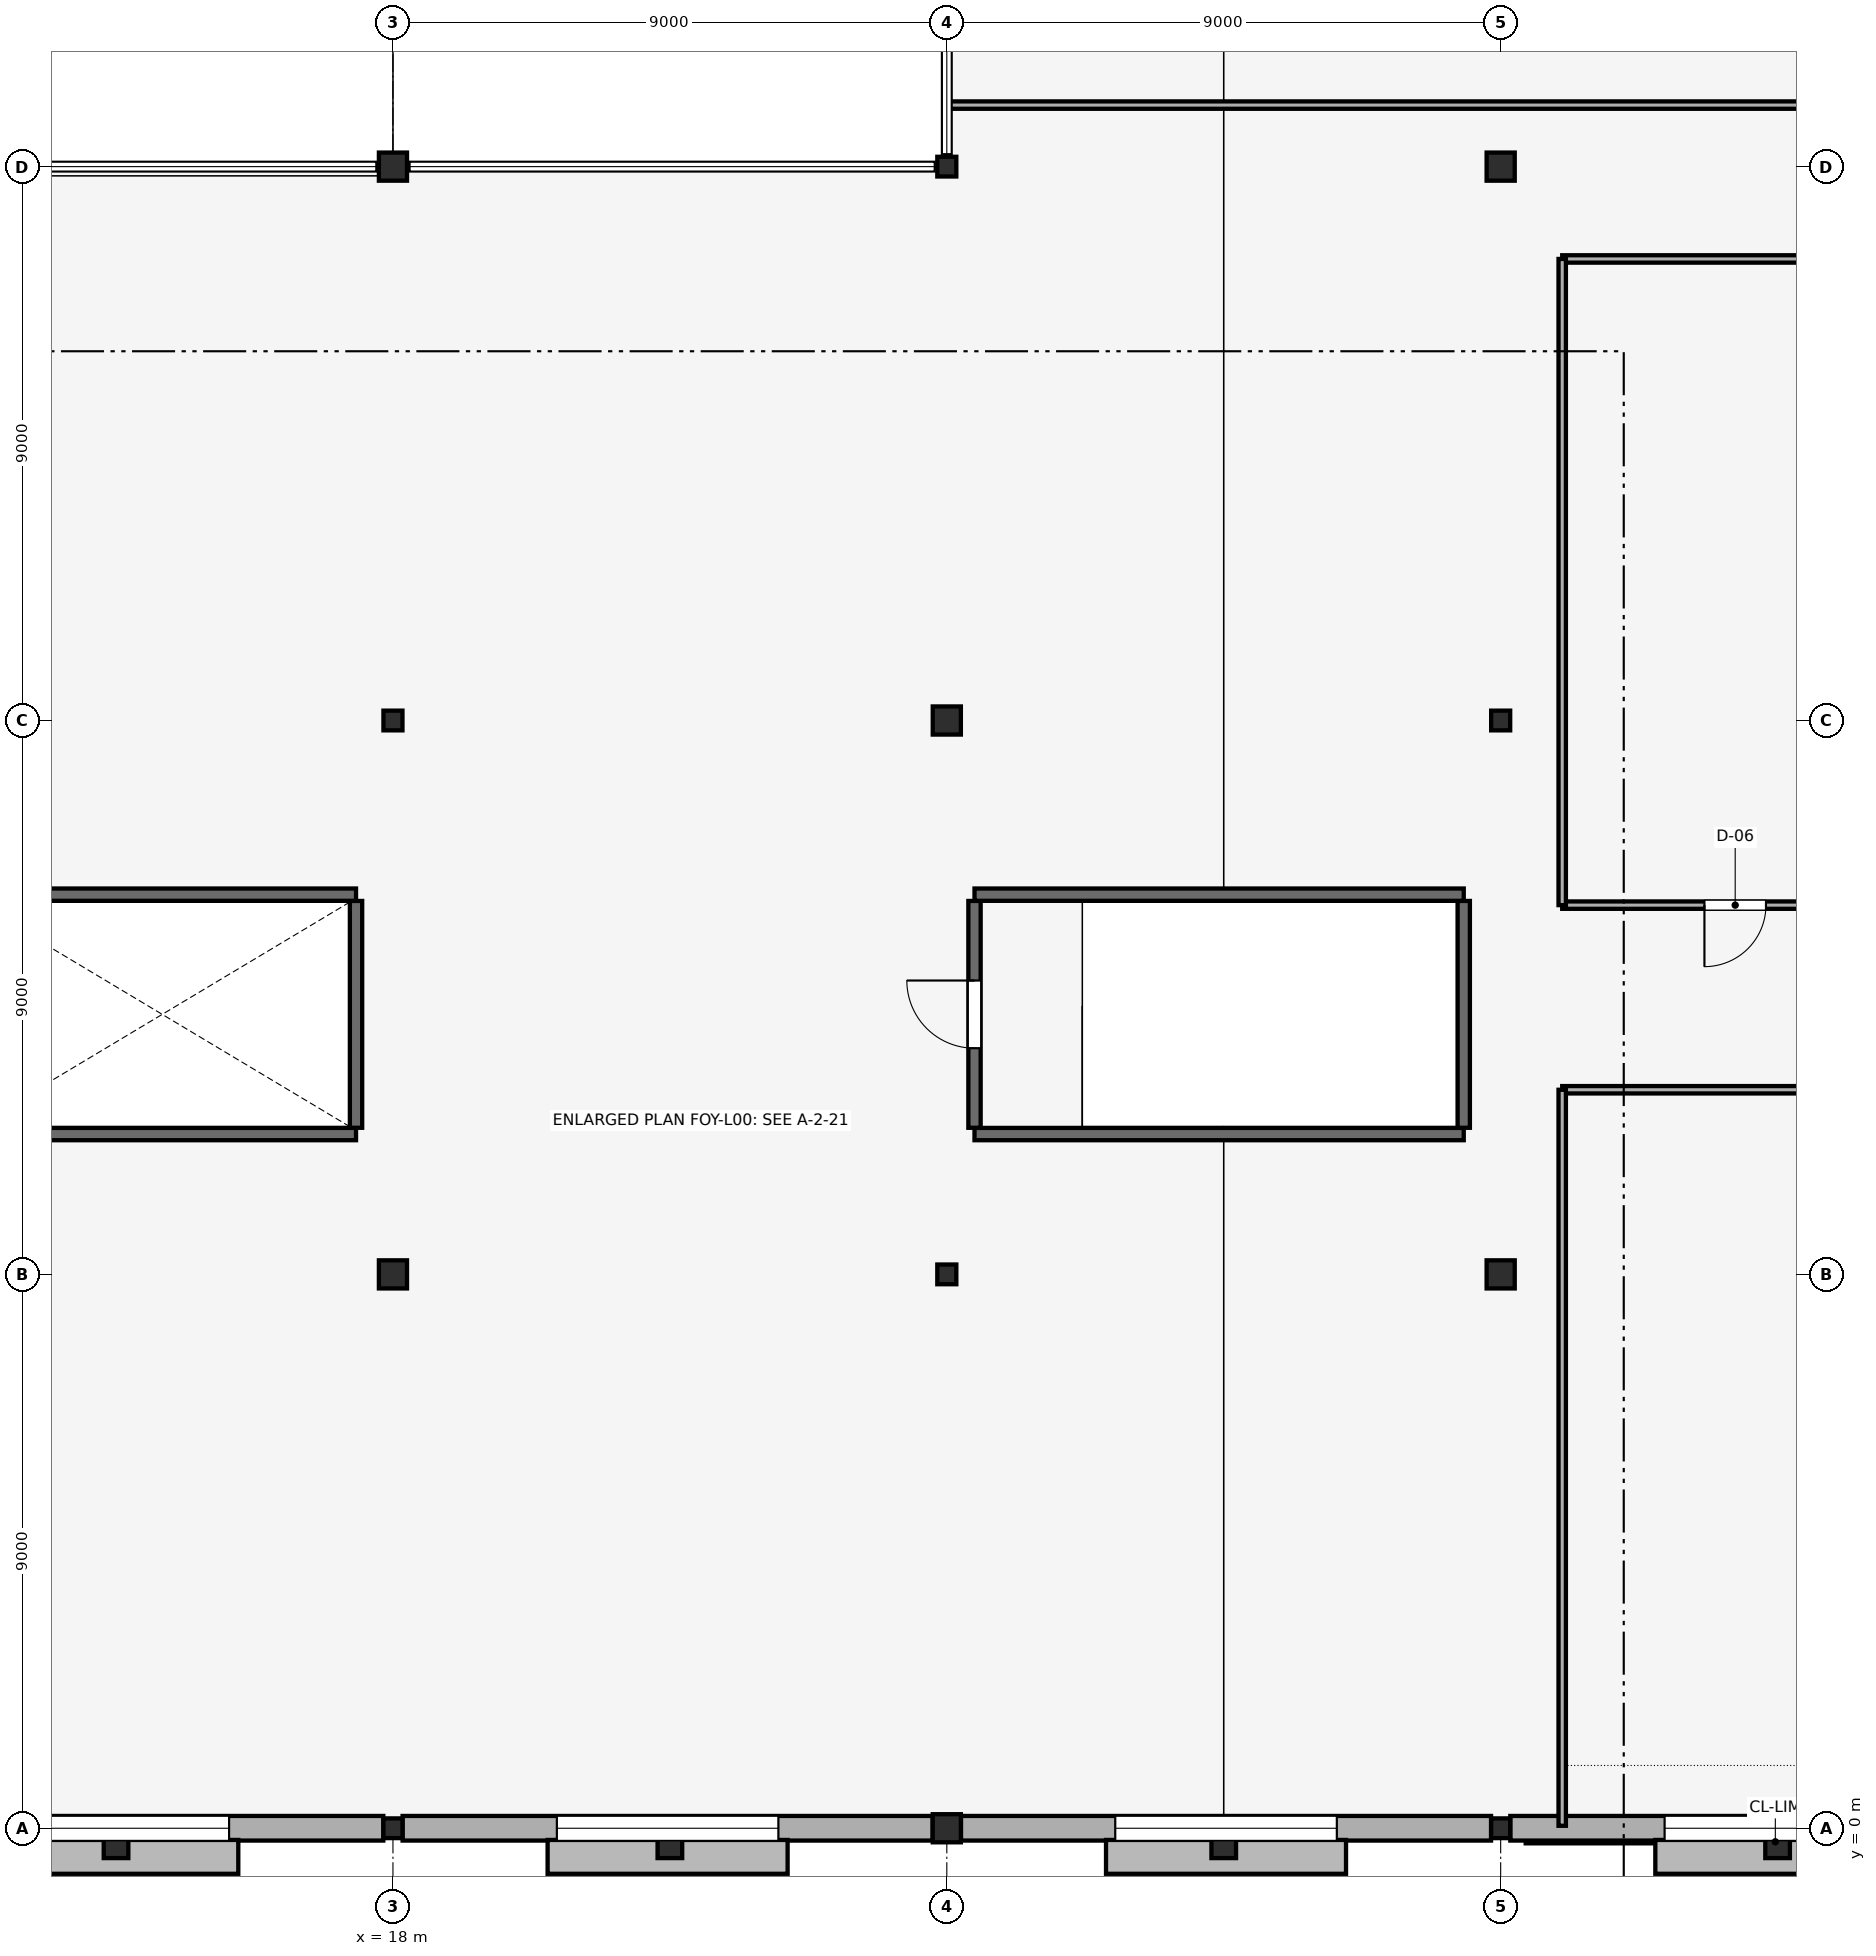
"""IFC4 building model, lengths in metres.
Left out: names, types, materials, properties, quantities, classifications, styles, units other than length and angle.
Written with IfcOpenShell. Run it as: python <this file> out.ifc"""

import sys

from ifc_helpers import new_model, si_unit, direction, frame, frame_2d, origin, origin_2d, place, context, subcontext, project, spatial, rectangle, hollow_circle, i_section, extrude, element, fill, save


model = new_model("IFC4")
c1 = context("Model", 3, precision=1e-05, world=origin(), true_north=direction((0.0, 1.0)))
c2 = subcontext(c1, "Body", "Model", "MODEL_VIEW")
j1 = project(units=[si_unit("LENGTHUNIT", "METRE"), si_unit("PLANEANGLEUNIT", "RADIAN")], contexts=[c1])
p1 = place(None, origin())
s1 = spatial("IfcSite", under=j1, at=p1, CompositionType="ELEMENT")
p2 = place(p1, origin())
s2 = spatial("IfcBuilding", under=s1, at=p2, CompositionType="ELEMENT")
p3 = place(p2, origin())
s3 = spatial("IfcBuildingStorey", under=s2, at=p3, CompositionType="ELEMENT", Elevation=0.0)
p4 = place(p3, frame((18.0, 0.0, 0.0), z_axis=(0.0, 0.0, 1.0), x_axis=(1.0, 0.0, 0.0)))
e1 = element("IfcColumn", 1, at=p4, inside=s3, PredefinedType="COLUMN", context=c2, shape_type="SweptSolid", body=[
    extrude(i_section(OverallWidth=0.309, OverallDepth=0.321, WebThickness=0.014, FlangeThickness=0.022, FilletRadius=0.015, at=origin_2d()), origin(), (0.0, 0.0, 1.0), 5.4),
])
p5 = place(p3, frame((18.0, 9.0, 0.0), z_axis=(0.0, 0.0, 1.0), x_axis=(1.0, 0.0, 0.0)))
e2 = element("IfcColumn", 2, at=p5, inside=s3, PredefinedType="COLUMN", context=c2, shape_type="SweptSolid", body=[
    extrude(hollow_circle(Radius=0.229, WallThickness=0.02, at=origin_2d()), origin(), (0.0, 0.0, 1.0), 5.4),
])
p6 = place(p3, frame((18.0, 18.0, 0.0), z_axis=(0.0, 0.0, 1.0), x_axis=(1.0, 0.0, 0.0)))
e3 = element("IfcColumn", 3, at=p6, inside=s3, PredefinedType="COLUMN", context=c2, shape_type="SweptSolid", body=[
    extrude(i_section(OverallWidth=0.309, OverallDepth=0.321, WebThickness=0.014, FlangeThickness=0.022, FilletRadius=0.015, at=origin_2d()), origin(), (0.0, 0.0, 1.0), 5.4),
])
for number, where, z_axis, x_axis in (
    (4, (18.0, 27.0, 0.0), (0.0, 0.0, 1.0), (1.0, 0.0, 0.0)),
    (5, (27.0, 0.0, 0.0), (0.0, 0.0, 1.0), (1.0, 0.0, 0.0)),
):
    element("IfcColumn", number, at=place(p3, frame(where, z_axis=z_axis, x_axis=x_axis)), inside=s3, PredefinedType="COLUMN", context=c2, shape_type="SweptSolid", body=[
        extrude(hollow_circle(Radius=0.229, WallThickness=0.02, at=origin_2d()), origin(), (0.0, 0.0, 1.0), 5.4),
    ])
p7 = place(p3, frame((27.0, 9.0, 0.0), z_axis=(0.0, 0.0, 1.0), x_axis=(1.0, 0.0, 0.0)))
e6 = element("IfcColumn", 6, at=p7, inside=s3, PredefinedType="COLUMN", context=c2, shape_type="SweptSolid", body=[
    extrude(i_section(OverallWidth=0.309, OverallDepth=0.321, WebThickness=0.014, FlangeThickness=0.022, FilletRadius=0.015, at=origin_2d()), origin(), (0.0, 0.0, 1.0), 5.4),
])
p8 = place(p3, frame((27.0, 18.0, 0.0), z_axis=(0.0, 0.0, 1.0), x_axis=(1.0, 0.0, 0.0)))
e7 = element("IfcColumn", 7, at=p8, inside=s3, PredefinedType="COLUMN", context=c2, shape_type="SweptSolid", body=[
    extrude(hollow_circle(Radius=0.229, WallThickness=0.02, at=origin_2d()), origin(), (0.0, 0.0, 1.0), 5.4),
])
for number, where, z_axis, x_axis in (
    (8, (27.0, 27.0, 0.0), (0.0, 0.0, 1.0), (1.0, 0.0, 0.0)),
    (9, (36.0, 0.0, 0.0), (0.0, 0.0, 1.0), (1.0, 0.0, 0.0)),
):
    element("IfcColumn", number, at=place(p3, frame(where, z_axis=z_axis, x_axis=x_axis)), inside=s3, PredefinedType="COLUMN", context=c2, shape_type="SweptSolid", body=[
        extrude(i_section(OverallWidth=0.309, OverallDepth=0.321, WebThickness=0.014, FlangeThickness=0.022, FilletRadius=0.015, at=origin_2d()), origin(), (0.0, 0.0, 1.0), 5.4),
    ])
p9 = place(p3, frame((36.0, 9.0, 0.0), z_axis=(0.0, 0.0, 1.0), x_axis=(1.0, 0.0, 0.0)))
e10 = element("IfcColumn", 10, at=p9, inside=s3, PredefinedType="COLUMN", context=c2, shape_type="SweptSolid", body=[
    extrude(hollow_circle(Radius=0.229, WallThickness=0.02, at=origin_2d()), origin(), (0.0, 0.0, 1.0), 5.4),
])
p10 = place(p3, frame((36.0, 18.0, 0.0), z_axis=(0.0, 0.0, 1.0), x_axis=(1.0, 0.0, 0.0)))
e11 = element("IfcColumn", 11, at=p10, inside=s3, PredefinedType="COLUMN", context=c2, shape_type="SweptSolid", body=[
    extrude(i_section(OverallWidth=0.309, OverallDepth=0.321, WebThickness=0.014, FlangeThickness=0.022, FilletRadius=0.015, at=origin_2d()), origin(), (0.0, 0.0, 1.0), 5.4),
])
p11 = place(p3, frame((36.0, 27.0, 0.0), z_axis=(0.0, 0.0, 1.0), x_axis=(1.0, 0.0, 0.0)))
e12 = element("IfcColumn", 12, at=p11, inside=s3, PredefinedType="COLUMN", context=c2, shape_type="SweptSolid", body=[
    extrude(hollow_circle(Radius=0.229, WallThickness=0.02, at=origin_2d()), origin(), (0.0, 0.0, 1.0), 5.4),
])
for number, where, z_axis, x_axis in (
    (13, (13.5, -0.26, 0.0), (0.0, 0.0, 1.0), (1.0, 0.0, 0.0)),
    (14, (22.5, -0.26, 0.0), (0.0, 0.0, 1.0), (1.0, 0.0, 0.0)),
    (15, (31.5, -0.26, 0.0), (0.0, 0.0, 1.0), (1.0, 0.0, 0.0)),
    (16, (40.5, -0.26, 0.0), (0.0, 0.0, 1.0), (1.0, 0.0, 0.0)),
):
    element("IfcColumn", number, at=place(p3, frame(where, z_axis=z_axis, x_axis=x_axis)), inside=s3, PredefinedType="PILASTER", context=c2, shape_type="SweptSolid", body=[
        extrude(rectangle(XDim=0.4, YDim=0.45, at=origin_2d()), origin(), (0.0, 0.0, 1.0), 5.12),
    ])
p12 = place(p3, frame((44.77, 0.0, 0.0), z_axis=(0.0, 0.0, 1.0), x_axis=(-1.0, 0.0, 0.0)))
e17 = element("IfcWall", 17, at=p12, inside=s3, PredefinedType="STANDARD", context=c2, shape_type="SweptSolid", body=[
    extrude(rectangle(XDim=8.613, YDim=0.4, at=frame_2d((4.307, 0.0))), origin(), (0.0, 0.0, 1.0), 4.507),
])
p13 = place(p12, frame((2.506, 0.0, 0.85)))
e18 = element("IfcOpeningElement", 18, at=p13, cuts=e17, PredefinedType="OPENING", context=c2, shape_type="SweptSolid", body=[
    extrude(rectangle(XDim=3.6, YDim=2.4, at=frame_2d((1.8, 1.2))), frame((0.0, 0.21, 0.0), z_axis=(0.0, -1.0, 0.0), x_axis=(1.0, 0.0, 0.0)), (0.0, 0.0, 1.0), 0.42),
])
p14 = place(p3, frame((35.844, 0.0, 0.0), z_axis=(0.0, 0.0, 1.0), x_axis=(-1.0, 0.0, 0.0)))
e19 = element("IfcWall", 19, at=p14, inside=s3, PredefinedType="STANDARD", context=c2, shape_type="SweptSolid", body=[
    extrude(rectangle(XDim=8.613, YDim=0.4, at=frame_2d((4.307, 0.0))), origin(), (0.0, 0.0, 1.0), 4.507),
])
p15 = place(p14, frame((2.506, 0.0, 0.85)))
e20 = element("IfcOpeningElement", 20, at=p15, cuts=e19, PredefinedType="OPENING", context=c2, shape_type="SweptSolid", body=[
    extrude(rectangle(XDim=3.6, YDim=2.4, at=frame_2d((1.8, 1.2))), frame((0.0, 0.21, 0.0), z_axis=(0.0, -1.0, 0.0), x_axis=(1.0, 0.0, 0.0)), (0.0, 0.0, 1.0), 0.42),
])
p16 = place(p3, frame((26.77, 0.0, 0.0), z_axis=(0.0, 0.0, 1.0), x_axis=(-1.0, 0.0, 0.0)))
e21 = element("IfcWall", 21, at=p16, inside=s3, PredefinedType="STANDARD", context=c2, shape_type="SweptSolid", body=[
    extrude(rectangle(XDim=8.613, YDim=0.4, at=frame_2d((4.307, 0.0))), origin(), (0.0, 0.0, 1.0), 4.465),
])
p17 = place(p16, frame((2.506, 0.0, 0.85)))
e22 = element("IfcOpeningElement", 22, at=p17, cuts=e21, PredefinedType="OPENING", context=c2, shape_type="SweptSolid", body=[
    extrude(rectangle(XDim=3.6, YDim=2.4, at=frame_2d((1.8, 1.2))), frame((0.0, 0.21, 0.0), z_axis=(0.0, -1.0, 0.0), x_axis=(1.0, 0.0, 0.0)), (0.0, 0.0, 1.0), 0.42),
])
p18 = place(p3, frame((17.844, 0.0, 0.0), z_axis=(0.0, 0.0, 1.0), x_axis=(-1.0, 0.0, 0.0)))
e23 = element("IfcWall", 23, at=p18, inside=s3, PredefinedType="STANDARD", context=c2, shape_type="SweptSolid", body=[
    extrude(rectangle(XDim=8.613, YDim=0.4, at=frame_2d((4.307, 0.0))), origin(), (0.0, 0.0, 1.0), 4.465),
])
p19 = place(p18, frame((2.506, 0.0, 0.85)))
e24 = element("IfcOpeningElement", 24, at=p19, cuts=e23, PredefinedType="OPENING", context=c2, shape_type="SweptSolid", body=[
    extrude(rectangle(XDim=3.6, YDim=2.4, at=frame_2d((1.8, 1.2))), frame((0.0, 0.21, 0.0), z_axis=(0.0, -1.0, 0.0), x_axis=(1.0, 0.0, 0.0)), (0.0, 0.0, 1.0), 0.42),
])
p20 = place(p3, frame((9.45, 11.28, 0.0), z_axis=(0.0, 0.0, 1.0), x_axis=(1.0, 0.0, 0.0)))
e25 = element("IfcWall", 25, at=p20, inside=s3, PredefinedType="SHEAR", context=c2, shape_type="SweptSolid", body=[
    extrude(rectangle(XDim=7.95, YDim=0.2, at=frame_2d((3.975, 0.0))), origin(), (0.0, 0.0, 1.0), 5.4),
])
p21 = place(p3, frame((17.4, 11.382, 0.0), z_axis=(0.0, 0.0, 1.0), x_axis=(0.0, 1.0, 0.0)))
e26 = element("IfcWall", 26, at=p21, inside=s3, PredefinedType="SHEAR", context=c2, shape_type="SweptSolid", body=[
    extrude(rectangle(XDim=3.686, YDim=0.2, at=frame_2d((1.843, 0.0))), origin(), (0.0, 0.0, 1.0), 5.4),
])
for number, where, z_axis, x_axis in (
    (27, (9.45, 15.17, 0.0), (0.0, 0.0, 1.0), (1.0, 0.0, 0.0)),
    (28, (27.45, 11.28, 0.0), (0.0, 0.0, 1.0), (1.0, 0.0, 0.0)),
):
    element("IfcWall", number, at=place(p3, frame(where, z_axis=z_axis, x_axis=x_axis)), inside=s3, PredefinedType="SHEAR", context=c2, shape_type="SweptSolid", body=[
        extrude(rectangle(XDim=7.95, YDim=0.2, at=frame_2d((3.975, 0.0))), origin(), (0.0, 0.0, 1.0), 5.4),
    ])
p22 = place(p3, frame((27.45, 11.382, 0.0), z_axis=(0.0, 0.0, 1.0), x_axis=(0.0, 1.0, 0.0)))
e29 = element("IfcWall", 29, at=p22, inside=s3, PredefinedType="SHEAR", context=c2, shape_type="SweptSolid", body=[
    extrude(rectangle(XDim=3.686, YDim=0.2, at=frame_2d((1.843, 0.0))), origin(), (0.0, 0.0, 1.0), 5.4),
])
p23 = place(p22, frame((1.293, 0.0, 0.0)))
e30 = element("IfcOpeningElement", 30, at=p23, cuts=e29, PredefinedType="OPENING", context=c2, shape_type="SweptSolid", body=[
    extrude(rectangle(XDim=1.1, YDim=2.15, at=frame_2d((0.55, 1.075))), frame((0.0, 0.11, 0.0), z_axis=(0.0, -1.0, 0.0), x_axis=(1.0, 0.0, 0.0)), (0.0, 0.0, 1.0), 0.22),
])
p24 = place(p3, frame((35.4, 11.382, 0.0), z_axis=(0.0, 0.0, 1.0), x_axis=(0.0, 1.0, 0.0)))
e31 = element("IfcWall", 31, at=p24, inside=s3, PredefinedType="SHEAR", context=c2, shape_type="SweptSolid", body=[
    extrude(rectangle(XDim=3.686, YDim=0.2, at=frame_2d((1.843, 0.0))), origin(), (0.0, 0.0, 1.0), 5.4),
])
p25 = place(p3, frame((27.45, 15.17, 0.0), z_axis=(0.0, 0.0, 1.0), x_axis=(1.0, 0.0, 0.0)))
e32 = element("IfcWall", 32, at=p25, inside=s3, PredefinedType="SHEAR", context=c2, shape_type="SweptSolid", body=[
    extrude(rectangle(XDim=7.95, YDim=0.2, at=frame_2d((3.975, 0.0))), origin(), (0.0, 0.0, 1.0), 5.4),
])
p26 = place(p3, frame((37.0, 12.0, 0.0), z_axis=(0.0, 0.0, 1.0), x_axis=(1.0, 0.0, 0.0)))
e33 = element("IfcWall", 33, at=p26, inside=s3, PredefinedType="PARTITIONING", context=c2, shape_type="SweptSolid", body=[
    extrude(rectangle(XDim=16.96, YDim=0.12, at=frame_2d((8.48, 0.0))), origin(), (0.0, 0.0, 1.0), 4.658),
])
p27 = place(p26, frame((12.643, 0.0, 0.0)))
e34 = element("IfcOpeningElement", 34, at=p27, cuts=e33, PredefinedType="OPENING", context=c2, shape_type="SweptSolid", body=[
    extrude(rectangle(XDim=0.95, YDim=2.1, at=frame_2d((0.475, 1.05))), frame((0.0, 0.07, 0.0), z_axis=(0.0, -1.0, 0.0), x_axis=(1.0, 0.0, 0.0)), (0.0, 0.0, 1.0), 0.14),
])
p28 = place(p3, frame((37.0, 0.04, 0.0), z_axis=(0.0, 0.0, 1.0), x_axis=(0.0, 1.0, 0.0)))
e35 = element("IfcWall", 35, at=p28, inside=s3, PredefinedType="PARTITIONING", context=c2, shape_type="SweptSolid", body=[
    extrude(rectangle(XDim=11.96, YDim=0.12, at=frame_2d((5.98, 0.0))), origin(), (0.0, 0.0, 1.0), 5.12),
])
p29 = place(p3, frame((37.0, 25.5, 0.0), z_axis=(0.0, 0.0, 1.0), x_axis=(1.0, 0.0, 0.0)))
e36 = element("IfcWall", 36, at=p29, inside=s3, PredefinedType="PARTITIONING", context=c2, shape_type="SweptSolid", body=[
    extrude(rectangle(XDim=16.96, YDim=0.12, at=frame_2d((8.48, 0.0))), origin(), (0.0, 0.0, 1.0), 5.12),
])
p30 = place(p3, frame((53.96, 15.0, 0.0), z_axis=(0.0, 0.0, 1.0), x_axis=(-1.0, 0.0, 0.0)))
e37 = element("IfcWall", 37, at=p30, inside=s3, PredefinedType="PARTITIONING", context=c2, shape_type="SweptSolid", body=[
    extrude(rectangle(XDim=16.96, YDim=0.12, at=frame_2d((8.48, 0.0))), origin(), (0.0, 0.0, 1.0), 4.658),
])
p31 = place(p30, frame((13.649, 0.0, 0.0)))
e38 = element("IfcOpeningElement", 38, at=p31, cuts=e37, PredefinedType="OPENING", context=c2, shape_type="SweptSolid", body=[
    extrude(rectangle(XDim=1.0, YDim=2.15, at=frame_2d((0.5, 1.075))), frame((0.0, 0.07, 0.0), z_axis=(0.0, -1.0, 0.0), x_axis=(1.0, 0.0, 0.0)), (0.0, 0.0, 1.0), 0.14),
])
p32 = place(p3, frame((37.0, 15.0, 0.0), z_axis=(0.0, 0.0, 1.0), x_axis=(0.0, 1.0, 0.0)))
e39 = element("IfcWall", 39, at=p32, inside=s3, PredefinedType="PARTITIONING", context=c2, shape_type="SweptSolid", body=[
    extrude(rectangle(XDim=10.5, YDim=0.12, at=frame_2d((5.25, 0.0))), origin(), (0.0, 0.0, 1.0), 5.12),
])
p33 = place(p3, frame((41.5, 28.0, 0.0), z_axis=(0.0, 0.0, 1.0), x_axis=(-1.0, 0.0, 0.0)))
e40 = element("IfcWall", 40, at=p33, inside=s3, PredefinedType="PARTITIONING", context=c2, shape_type="SweptSolid", body=[
    extrude(rectangle(XDim=14.48, YDim=0.12, at=frame_2d((7.24, 0.0))), origin(), (0.0, 0.0, 1.0), 5.12),
])
p34 = place(p13, origin())
e41 = element("IfcWindow", 41, at=p34, inside=s3, PartitioningType="SINGLE_PANEL", PredefinedType="WINDOW", context=c2, shape_type="SweptSolid", body=[
    extrude(rectangle(XDim=3.6, YDim=2.4, at=frame_2d((1.8, 1.2))), frame((0.0, 0.03, 0.0), z_axis=(0.0, -1.0, 0.0), x_axis=(1.0, 0.0, 0.0)), (0.0, 0.0, 1.0), 0.06),
])
fill(e18, e41)
p35 = place(p15, origin())
e42 = element("IfcWindow", 42, at=p35, inside=s3, PartitioningType="SINGLE_PANEL", PredefinedType="WINDOW", context=c2, shape_type="SweptSolid", body=[
    extrude(rectangle(XDim=3.6, YDim=2.4, at=frame_2d((1.8, 1.2))), frame((0.0, 0.03, 0.0), z_axis=(0.0, -1.0, 0.0), x_axis=(1.0, 0.0, 0.0)), (0.0, 0.0, 1.0), 0.06),
])
fill(e20, e42)
p36 = place(p17, origin())
e43 = element("IfcWindow", 43, at=p36, inside=s3, PartitioningType="SINGLE_PANEL", PredefinedType="WINDOW", context=c2, shape_type="SweptSolid", body=[
    extrude(rectangle(XDim=3.6, YDim=2.4, at=frame_2d((1.8, 1.2))), frame((0.0, 0.03, 0.0), z_axis=(0.0, -1.0, 0.0), x_axis=(1.0, 0.0, 0.0)), (0.0, 0.0, 1.0), 0.06),
])
fill(e22, e43)
p37 = place(p19, origin())
e44 = element("IfcWindow", 44, at=p37, inside=s3, PartitioningType="SINGLE_PANEL", PredefinedType="WINDOW", context=c2, shape_type="SweptSolid", body=[
    extrude(rectangle(XDim=3.6, YDim=2.4, at=frame_2d((1.8, 1.2))), frame((0.0, 0.03, 0.0), z_axis=(0.0, -1.0, 0.0), x_axis=(1.0, 0.0, 0.0)), (0.0, 0.0, 1.0), 0.06),
])
fill(e24, e44)
p38 = place(p23, frame((1.1, 0.0, 0.0), z_axis=(0.0, 0.0, 1.0), x_axis=(-1.0, 0.0, 0.0)))
e45 = element("IfcDoor", 45, at=p38, inside=s3, OperationType="SINGLE_SWING_LEFT", PredefinedType="DOOR", context=c2, shape_type="SweptSolid", body=[
    extrude(rectangle(XDim=1.1, YDim=2.15, at=frame_2d((0.55, 1.075))), frame((0.0, 0.025, 0.0), z_axis=(0.0, -1.0, 0.0), x_axis=(1.0, 0.0, 0.0)), (0.0, 0.0, 1.0), 0.05),
])
fill(e30, e45)
p39 = place(p31, origin())
e46 = element("IfcDoor", 46, at=p39, inside=s3, OperationType="SINGLE_SWING_RIGHT", PredefinedType="DOOR", context=c2, shape_type="SweptSolid", body=[
    extrude(rectangle(XDim=1.0, YDim=2.15, at=frame_2d((0.5, 1.075))), frame((0.0, 0.025, 0.0), z_axis=(0.0, -1.0, 0.0), x_axis=(1.0, 0.0, 0.0)), (0.0, 0.0, 1.0), 0.05),
])
fill(e38, e46)
save(model, sys.argv[1])
